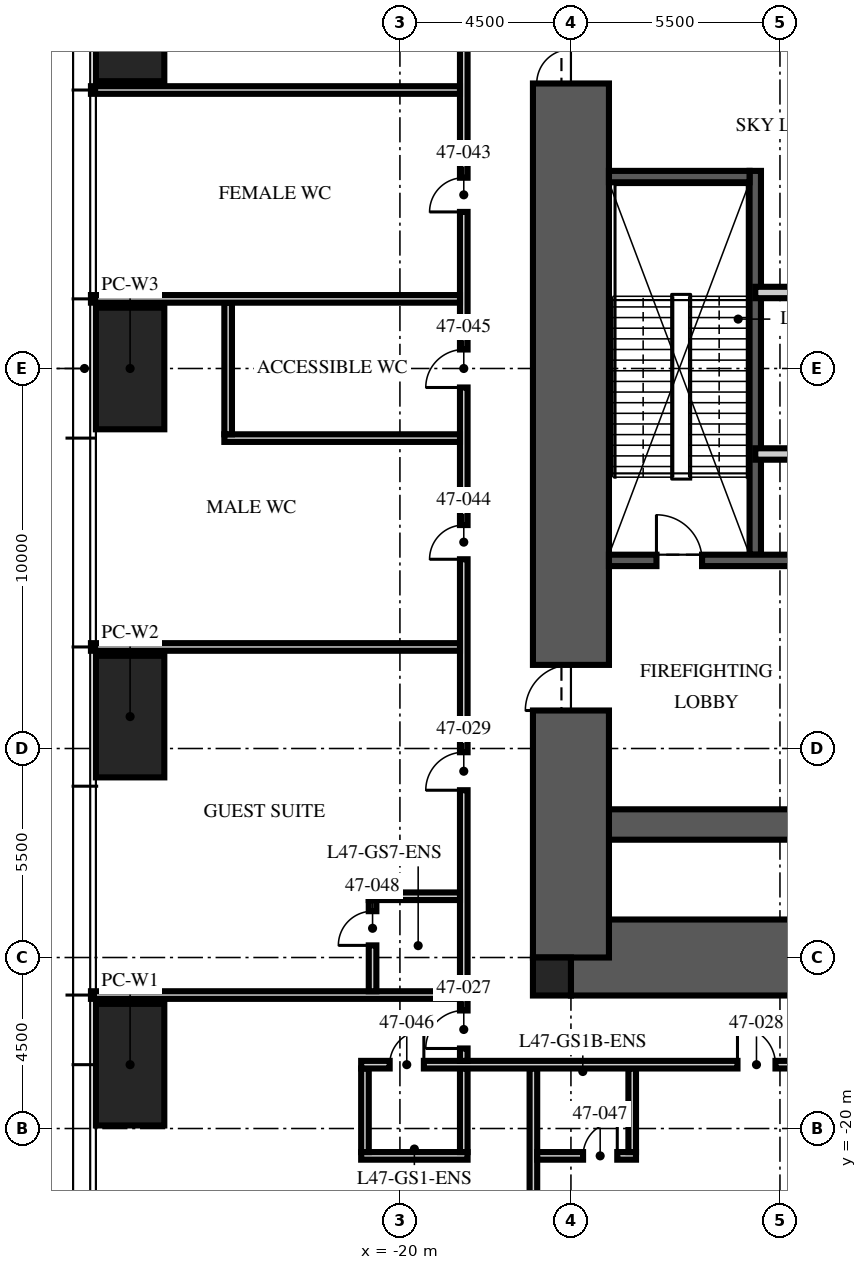
"""IFC4 building model, lengths in metres.
Left out: names, types, materials, properties, quantities, classifications, styles, units other than length and angle.
Written with IfcOpenShell. Run it as: python <this file> out.ifc"""

import sys

from ifc_helpers import new_model, si_unit, direction, frame, frame_2d, origin, origin_2d, place, context, subcontext, project, spatial, rectangle, hollow_rectangle, extrude, element, fill, save


model = new_model("IFC4")
c1 = context("Model", 3, precision=1e-05, world=origin(), true_north=direction((0.0, 1.0)))
c2 = subcontext(c1, "Body", "Model", "MODEL_VIEW")
j1 = project(units=[si_unit("LENGTHUNIT", "METRE"), si_unit("PLANEANGLEUNIT", "RADIAN")], contexts=[c1])
p1 = place(None, origin())
s1 = spatial("IfcSite", under=j1, at=p1, CompositionType="ELEMENT")
p2 = place(p1, origin())
s2 = spatial("IfcBuilding", under=s1, at=p2, CompositionType="ELEMENT")
p3 = place(p2, frame((0.0, 0.0, 186.0)))
s3 = spatial("IfcBuildingStorey", under=s2, at=p3, CompositionType="ELEMENT", Elevation=186.0)
p4 = place(p3, frame((-15.5, -15.5, -0.3), z_axis=(0.0, 0.0, 1.0), x_axis=(1.0, 0.0, 0.0)))
e1 = element("IfcWall", 1, at=p4, inside=s3, PredefinedType="SHEAR", context=c2, shape_type="SweptSolid", body=[
    extrude(rectangle(XDim=31.0, YDim=2.0, at=frame_2d((15.5, 0.0))), origin(), (0.0, 0.0, 1.0), 5.95),
])
p5 = place(p4, frame((10.4, 0.0, 0.3)))
e2 = element("IfcOpeningElement", 2, at=p5, cuts=e1, PredefinedType="OPENING", context=c2, shape_type="SweptSolid", body=[
    extrude(rectangle(XDim=1.1, YDim=2.1, at=frame_2d((0.55, 1.05))), frame((0.0, 1.01, 0.0), z_axis=(0.0, -1.0, 0.0), x_axis=(1.0, 0.0, 0.0)), (0.0, 0.0, 1.0), 2.02),
])
p6 = place(p4, frame((13.5, 0.0, 0.3)))
e3 = element("IfcOpeningElement", 3, at=p6, cuts=e1, PredefinedType="OPENING", context=c2, shape_type="SweptSolid", body=[
    extrude(rectangle(XDim=1.1, YDim=2.1, at=frame_2d((0.55, 1.05))), frame((0.0, 1.01, 0.0), z_axis=(0.0, -1.0, 0.0), x_axis=(1.0, 0.0, 0.0)), (0.0, 0.0, 1.0), 2.02),
])
p7 = place(p4, frame((16.6, 0.0, 0.3)))
e4 = element("IfcOpeningElement", 4, at=p7, cuts=e1, PredefinedType="OPENING", context=c2, shape_type="SweptSolid", body=[
    extrude(rectangle(XDim=1.1, YDim=2.1, at=frame_2d((0.55, 1.05))), frame((0.0, 1.01, 0.0), z_axis=(0.0, -1.0, 0.0), x_axis=(1.0, 0.0, 0.0)), (0.0, 0.0, 1.0), 2.02),
])
p8 = place(p3, frame((-15.5, -12.0, -0.3), z_axis=(0.0, 0.0, 1.0), x_axis=(1.0, 0.0, 0.0)))
e5 = element("IfcWall", 5, at=p8, inside=s3, PredefinedType="SHEAR", context=c2, shape_type="SweptSolid", body=[
    extrude(rectangle(XDim=31.0, YDim=0.8, at=frame_2d((15.5, 0.0))), origin(), (0.0, 0.0, 1.0), 5.95),
])
p9 = place(p3, frame((-15.5, -15.5, -0.3), z_axis=(0.0, 0.0, 1.0), x_axis=(0.0, 1.0, 0.0)))
e6 = element("IfcWall", 6, at=p9, inside=s3, PredefinedType="SHEAR", context=c2, shape_type="SweptSolid", body=[
    extrude(rectangle(XDim=31.0, YDim=2.0, at=frame_2d((15.5, 0.0))), origin(), (0.0, 0.0, 1.0), 5.95),
])
p10 = place(p9, frame((6.5, 0.0, 0.3)))
e7 = element("IfcOpeningElement", 7, at=p10, cuts=e6, PredefinedType="OPENING", context=c2, shape_type="SweptSolid", body=[
    extrude(rectangle(XDim=1.2, YDim=2.1, at=frame_2d((0.6, 1.05))), frame((0.0, 1.01, 0.0), z_axis=(0.0, -1.0, 0.0), x_axis=(1.0, 0.0, 0.0)), (0.0, 0.0, 1.0), 2.02),
])
p11 = place(p9, frame((23.0, 0.0, 0.3)))
e8 = element("IfcOpeningElement", 8, at=p11, cuts=e6, PredefinedType="OPENING", context=c2, shape_type="SweptSolid", body=[
    extrude(rectangle(XDim=1.8, YDim=2.1, at=frame_2d((0.9, 1.05))), frame((0.0, 1.01, 0.0), z_axis=(0.0, -1.0, 0.0), x_axis=(1.0, 0.0, 0.0)), (0.0, 0.0, 1.0), 2.02),
])
p12 = place(p3, frame((-16.0, -16.0, -0.3), z_axis=(0.0, 0.0, 1.0), x_axis=(1.0, 0.0, 0.0)))
e9 = element("IfcColumn", 9, at=p12, inside=s3, PredefinedType="COLUMN", context=c2, shape_type="SweptSolid", body=[
    extrude(rectangle(XDim=1.0, YDim=1.0, at=origin_2d()), origin(), (0.0, 0.0, 1.0), 5.95),
])
p13 = place(p3, frame((-27.1, -18.32, 0.0), z_axis=(0.0, 0.0, 1.0), x_axis=(0.0, 1.0, 0.0)))
e10 = element("IfcColumn", 10, at=p13, inside=s3, PredefinedType="COLUMN", context=c2, shape_type="SweptSolid", body=[
    extrude(hollow_rectangle(XDim=3.2, YDim=1.8, WallThickness=0.2, at=origin_2d()), origin(), (0.0, 0.0, 1.0), 4.72),
])
p14 = place(p3, frame((-27.1, -9.16, 0.0), z_axis=(0.0, 0.0, 1.0), x_axis=(0.0, 1.0, 0.0)))
e11 = element("IfcColumn", 11, at=p14, inside=s3, PredefinedType="COLUMN", context=c2, shape_type="SweptSolid", body=[
    extrude(hollow_rectangle(XDim=3.2, YDim=1.8, WallThickness=0.2, at=origin_2d()), origin(), (0.0, 0.0, 1.0), 4.87),
])
p15 = place(p3, frame((-27.1, 0.0, 0.0), z_axis=(0.0, 0.0, 1.0), x_axis=(0.0, 1.0, 0.0)))
e12 = element("IfcColumn", 12, at=p15, inside=s3, PredefinedType="COLUMN", context=c2, shape_type="SweptSolid", body=[
    extrude(hollow_rectangle(XDim=3.2, YDim=1.8, WallThickness=0.2, at=origin_2d()), origin(), (0.0, 0.0, 1.0), 5.03),
])
p16 = place(p3, frame((-27.1, 9.16, 0.0), z_axis=(0.0, 0.0, 1.0), x_axis=(0.0, 1.0, 0.0)))
e13 = element("IfcColumn", 13, at=p16, inside=s3, PredefinedType="COLUMN", context=c2, shape_type="SweptSolid", body=[
    extrude(hollow_rectangle(XDim=3.2, YDim=1.8, WallThickness=0.2, at=origin_2d()), origin(), (0.0, 0.0, 1.0), 4.87),
])
p17 = place(p3, frame((-10.65, -4.9, 0.0), z_axis=(0.0, 0.0, 1.0), x_axis=(0.0, 1.0, 0.0)))
e14 = element("IfcWall", 14, at=p17, inside=s3, PredefinedType="SOLIDWALL", context=c2, shape_type="SweptSolid", body=[
    extrude(rectangle(XDim=10.1, YDim=0.3, at=frame_2d((5.05, 0.0))), origin(), (0.0, 0.0, 1.0), 5.65),
])
p18 = place(p3, frame((-14.5, -5.05, 0.0), z_axis=(0.0, 0.0, 1.0), x_axis=(1.0, 0.0, 0.0)))
e15 = element("IfcWall", 15, at=p18, inside=s3, PredefinedType="SOLIDWALL", context=c2, shape_type="SweptSolid", body=[
    extrude(rectangle(XDim=5.7, YDim=0.3, at=frame_2d((2.85, 0.0))), origin(), (0.0, 0.0, 1.0), 5.65),
])
p19 = place(p18, frame((1.25, 0.0, 0.0)))
e16 = element("IfcOpeningElement", 16, at=p19, cuts=e15, PredefinedType="OPENING", context=c2, shape_type="SweptSolid", body=[
    extrude(rectangle(XDim=1.2, YDim=2.1, at=frame_2d((0.6, 1.05))), frame((0.0, 0.16, 0.0), z_axis=(0.0, -1.0, 0.0), x_axis=(1.0, 0.0, 0.0)), (0.0, 0.0, 1.0), 0.32),
])
p20 = place(p3, frame((-14.5, 5.05, 0.0), z_axis=(0.0, 0.0, 1.0), x_axis=(1.0, 0.0, 0.0)))
e17 = element("IfcWall", 17, at=p20, inside=s3, PredefinedType="SOLIDWALL", context=c2, shape_type="SweptSolid", body=[
    extrude(rectangle(XDim=3.7, YDim=0.3, at=frame_2d((1.85, 0.0))), origin(), (0.0, 0.0, 1.0), 5.65),
])
p21 = place(p3, frame((-10.65, 2.0, 0.0), z_axis=(0.0, 0.0, 1.0), x_axis=(1.0, 0.0, 0.0)))
e18 = element("IfcWall", 18, at=p21, inside=s3, PredefinedType="PARTITIONING", context=c2, shape_type="SweptSolid", body=[
    extrude(rectangle(XDim=21.3, YDim=0.3, at=frame_2d((10.65, 0.0))), origin(), (0.0, 0.0, 1.0), 5.65),
])
p22 = place(p21, frame((10.05, 0.0, 0.0)))
e19 = element("IfcOpeningElement", 19, at=p22, cuts=e18, PredefinedType="OPENING", context=c2, shape_type="SweptSolid", body=[
    extrude(rectangle(XDim=1.2, YDim=2.1, at=frame_2d((0.6, 1.05))), frame((0.0, 0.16, 0.0), z_axis=(0.0, -1.0, 0.0), x_axis=(1.0, 0.0, 0.0)), (0.0, 0.0, 1.0), 0.32),
])
p23 = place(p21, frame((18.942, 0.0, 0.0)))
e20 = element("IfcOpeningElement", 20, at=p23, cuts=e18, PredefinedType="OPENING", context=c2, shape_type="SweptSolid", body=[
    extrude(rectangle(XDim=0.9, YDim=2.1, at=frame_2d((0.45, 1.05))), frame((0.0, 0.16, 0.0), z_axis=(0.0, -1.0, 0.0), x_axis=(1.0, 0.0, 0.0)), (0.0, 0.0, 1.0), 0.32),
])
p24 = place(p3, frame((-10.65, -2.25, 0.0), z_axis=(0.0, 0.0, 1.0), x_axis=(1.0, 0.0, 0.0)))
e21 = element("IfcWall", 21, at=p24, inside=s3, PredefinedType="PARTITIONING", context=c2, shape_type="SweptSolid", body=[
    extrude(rectangle(XDim=7.35, YDim=0.3, at=frame_2d((3.675, 0.0))), origin(), (0.0, 0.0, 1.0), 5.65),
])
p25 = place(p3, frame((-16.488, -28.13, 0.0), z_axis=(0.0, 0.0, 1.0), x_axis=(0.0, 1.0, 0.0)))
e22 = element("IfcWall", 22, at=p25, inside=s3, PredefinedType="SOLIDWALL", context=c2, shape_type="SweptSolid", body=[
    extrude(rectangle(XDim=9.71, YDim=0.2, at=frame_2d((4.855, 0.0))), origin(), (0.0, 0.0, 1.0), 4.95),
])
p26 = place(p3, frame((-21.02, -20.72, 0.0), z_axis=(0.0, 0.0, 1.0), x_axis=(1.0, 0.0, 0.0)))
e23 = element("IfcWall", 23, at=p26, inside=s3, PredefinedType="SOLIDWALL", context=c2, shape_type="SweptSolid", body=[
    extrude(rectangle(XDim=2.8, YDim=0.2, at=frame_2d((1.4, 0.0))), origin(), (0.0, 0.0, 1.0), 4.45),
])
p27 = place(p3, frame((-16.388, -20.72, 0.0), z_axis=(0.0, 0.0, 1.0), x_axis=(1.0, 0.0, 0.0)))
e24 = element("IfcWall", 24, at=p27, inside=s3, PredefinedType="SOLIDWALL", context=c2, shape_type="SweptSolid", body=[
    extrude(rectangle(XDim=2.6, YDim=0.2, at=frame_2d((1.3, 0.0))), origin(), (0.0, 0.0, 1.0), 4.45),
])
p28 = place(p27, frame((1.207, 0.0, 0.0)))
e25 = element("IfcOpeningElement", 25, at=p28, cuts=e24, PredefinedType="OPENING", context=c2, shape_type="SweptSolid", body=[
    extrude(rectangle(XDim=0.9, YDim=2.1, at=frame_2d((0.45, 1.05))), frame((0.0, 0.11, 0.0), z_axis=(0.0, -1.0, 0.0), x_axis=(1.0, 0.0, 0.0)), (0.0, 0.0, 1.0), 0.22),
])
for number, where, z_axis, x_axis in (
    (26, (-20.92, -20.62, 0.0), (0.0, 0.0, 1.0), (0.0, 1.0, 0.0)),
    (27, (-18.32, -20.62, 0.0), (0.0, 0.0, 1.0), (0.0, 1.0, 0.0)),
    (28, (-13.888, -20.62, 0.0), (0.0, 0.0, 1.0), (0.0, 1.0, 0.0)),
):
    element("IfcWall", number, at=place(p3, frame(where, z_axis=z_axis, x_axis=x_axis)), inside=s3, PredefinedType="SOLIDWALL", context=c2, shape_type="SweptSolid", body=[
        extrude(rectangle(XDim=2.2, YDim=0.2, at=frame_2d((1.1, 0.0))), origin(), (0.0, 0.0, 1.0), 4.45),
    ])
p29 = place(p3, frame((-21.02, -18.32, 0.0), z_axis=(0.0, 0.0, 1.0), x_axis=(1.0, 0.0, 0.0)))
e29 = element("IfcWall", 29, at=p29, inside=s3, PredefinedType="SOLIDWALL", context=c2, shape_type="SweptSolid", body=[
    extrude(rectangle(XDim=42.04, YDim=0.2, at=frame_2d((21.02, 0.0))), origin(), (0.0, 0.0, 1.0), 4.45),
])
p30 = place(p29, frame((9.902, 0.0, 0.0)))
e30 = element("IfcOpeningElement", 30, at=p30, cuts=e29, PredefinedType="OPENING", context=c2, shape_type="SweptSolid", body=[
    extrude(rectangle(XDim=1.0, YDim=2.1, at=frame_2d((0.5, 1.05))), frame((0.0, 0.11, 0.0), z_axis=(0.0, -1.0, 0.0), x_axis=(1.0, 0.0, 0.0)), (0.0, 0.0, 1.0), 0.22),
])
p31 = place(p29, frame((20.13, 0.0, 0.0)))
e31 = element("IfcOpeningElement", 31, at=p31, cuts=e29, PredefinedType="OPENING", context=c2, shape_type="SweptSolid", body=[
    extrude(rectangle(XDim=1.8, YDim=2.4, at=frame_2d((0.9, 1.2))), frame((0.0, 0.11, 0.0), z_axis=(0.0, -1.0, 0.0), x_axis=(1.0, 0.0, 0.0)), (0.0, 0.0, 1.0), 0.22),
])
p32 = place(p29, frame((37.914, 0.0, 0.0)))
e32 = element("IfcOpeningElement", 32, at=p32, cuts=e29, PredefinedType="OPENING", context=c2, shape_type="SweptSolid", body=[
    extrude(rectangle(XDim=1.0, YDim=2.1, at=frame_2d((0.5, 1.05))), frame((0.0, 0.11, 0.0), z_axis=(0.0, -1.0, 0.0), x_axis=(1.0, 0.0, 0.0)), (0.0, 0.0, 1.0), 0.22),
])
p33 = place(p29, frame((31.118, 0.0, 0.0)))
e33 = element("IfcOpeningElement", 33, at=p33, cuts=e29, PredefinedType="OPENING", context=c2, shape_type="SweptSolid", body=[
    extrude(rectangle(XDim=1.0, YDim=2.1, at=frame_2d((0.5, 1.05))), frame((0.0, 0.11, 0.0), z_axis=(0.0, -1.0, 0.0), x_axis=(1.0, 0.0, 0.0)), (0.0, 0.0, 1.0), 0.22),
])
p34 = place(p29, frame((0.75, 0.0, 0.0)))
e34 = element("IfcOpeningElement", 34, at=p34, cuts=e29, PredefinedType="OPENING", context=c2, shape_type="SweptSolid", body=[
    extrude(rectangle(XDim=0.9, YDim=2.1, at=frame_2d((0.45, 1.05))), frame((0.0, 0.11, 0.0), z_axis=(0.0, -1.0, 0.0), x_axis=(1.0, 0.0, 0.0)), (0.0, 0.0, 1.0), 0.22),
])
p35 = place(p29, frame((39.99, 0.0, 0.0)))
e35 = element("IfcOpeningElement", 35, at=p35, cuts=e29, PredefinedType="OPENING", context=c2, shape_type="SweptSolid", body=[
    extrude(rectangle(XDim=0.9, YDim=2.1, at=frame_2d((0.45, 1.05))), frame((0.0, 0.11, 0.0), z_axis=(0.0, -1.0, 0.0), x_axis=(1.0, 0.0, 0.0)), (0.0, 0.0, 1.0), 0.22),
])
p36 = place(p3, frame((-18.32, -18.22, 0.0), z_axis=(0.0, 0.0, 1.0), x_axis=(0.0, 1.0, 0.0)))
e36 = element("IfcWall", 36, at=p36, inside=s3, PredefinedType="SOLIDWALL", context=c2, shape_type="SweptSolid", body=[
    extrude(rectangle(XDim=36.44, YDim=0.2, at=frame_2d((18.22, 0.0))), origin(), (0.0, 0.0, 1.0), 4.45),
])
p37 = place(p36, frame((0.326, 0.0, 0.0)))
e37 = element("IfcOpeningElement", 37, at=p37, cuts=e36, PredefinedType="OPENING", context=c2, shape_type="SweptSolid", body=[
    extrude(rectangle(XDim=1.0, YDim=2.1, at=frame_2d((0.5, 1.05))), frame((0.0, 0.11, 0.0), z_axis=(0.0, -1.0, 0.0), x_axis=(1.0, 0.0, 0.0)), (0.0, 0.0, 1.0), 0.22),
])
p38 = place(p36, frame((7.122, 0.0, 0.0)))
e38 = element("IfcOpeningElement", 38, at=p38, cuts=e36, PredefinedType="OPENING", context=c2, shape_type="SweptSolid", body=[
    extrude(rectangle(XDim=1.0, YDim=2.1, at=frame_2d((0.5, 1.05))), frame((0.0, 0.11, 0.0), z_axis=(0.0, -1.0, 0.0), x_axis=(1.0, 0.0, 0.0)), (0.0, 0.0, 1.0), 0.22),
])
p39 = place(p36, frame((28.338, 0.0, 0.0)))
e39 = element("IfcOpeningElement", 39, at=p39, cuts=e36, PredefinedType="OPENING", context=c2, shape_type="SweptSolid", body=[
    extrude(rectangle(XDim=1.0, YDim=2.1, at=frame_2d((0.5, 1.05))), frame((0.0, 0.11, 0.0), z_axis=(0.0, -1.0, 0.0), x_axis=(1.0, 0.0, 0.0)), (0.0, 0.0, 1.0), 0.22),
])
p40 = place(p36, frame((22.34, 0.0, 0.0)))
e40 = element("IfcOpeningElement", 40, at=p40, cuts=e36, PredefinedType="OPENING", context=c2, shape_type="SweptSolid", body=[
    extrude(rectangle(XDim=0.9, YDim=2.1, at=frame_2d((0.45, 1.05))), frame((0.0, 0.11, 0.0), z_axis=(0.0, -1.0, 0.0), x_axis=(1.0, 0.0, 0.0)), (0.0, 0.0, 1.0), 0.22),
])
p41 = place(p36, frame((13.2, 0.0, 0.0)))
e41 = element("IfcOpeningElement", 41, at=p41, cuts=e36, PredefinedType="OPENING", context=c2, shape_type="SweptSolid", body=[
    extrude(rectangle(XDim=0.9, YDim=2.1, at=frame_2d((0.45, 1.05))), frame((0.0, 0.11, 0.0), z_axis=(0.0, -1.0, 0.0), x_axis=(1.0, 0.0, 0.0)), (0.0, 0.0, 1.0), 0.22),
])
p42 = place(p36, frame((17.72, 0.0, 0.0)))
e42 = element("IfcOpeningElement", 42, at=p42, cuts=e36, PredefinedType="OPENING", context=c2, shape_type="SweptSolid", body=[
    extrude(rectangle(XDim=1.0, YDim=2.1, at=frame_2d((0.5, 1.05))), frame((0.0, 0.11, 0.0), z_axis=(0.0, -1.0, 0.0), x_axis=(1.0, 0.0, 0.0)), (0.0, 0.0, 1.0), 0.22),
])
p43 = place(p3, frame((-28.13, -16.488, 0.0), z_axis=(0.0, 0.0, 1.0), x_axis=(1.0, 0.0, 0.0)))
e43 = element("IfcWall", 43, at=p43, inside=s3, PredefinedType="SOLIDWALL", context=c2, shape_type="SweptSolid", body=[
    extrude(rectangle(XDim=9.71, YDim=0.2, at=frame_2d((4.855, 0.0))), origin(), (0.0, 0.0, 1.0), 4.95),
])
p44 = place(p3, frame((-20.72, -16.388, 0.0), z_axis=(0.0, 0.0, 1.0), x_axis=(0.0, 1.0, 0.0)))
e44 = element("IfcWall", 44, at=p44, inside=s3, PredefinedType="SOLIDWALL", context=c2, shape_type="SweptSolid", body=[
    extrude(rectangle(XDim=2.4, YDim=0.2, at=frame_2d((1.2, 0.0))), origin(), (0.0, 0.0, 1.0), 5.65),
])
p45 = place(p44, frame((1.207, 0.0, 0.0)))
e45 = element("IfcOpeningElement", 45, at=p45, cuts=e44, PredefinedType="OPENING", context=c2, shape_type="SweptSolid", body=[
    extrude(rectangle(XDim=0.9, YDim=2.1, at=frame_2d((0.45, 1.05))), frame((0.0, 0.11, 0.0), z_axis=(0.0, -1.0, 0.0), x_axis=(1.0, 0.0, 0.0)), (0.0, 0.0, 1.0), 0.22),
])
p46 = place(p3, frame((-20.82, -13.888, 0.0), z_axis=(0.0, 0.0, 1.0), x_axis=(1.0, 0.0, 0.0)))
e46 = element("IfcWall", 46, at=p46, inside=s3, PredefinedType="SOLIDWALL", context=c2, shape_type="SweptSolid", body=[
    extrude(rectangle(XDim=2.4, YDim=0.2, at=frame_2d((1.2, 0.0))), origin(), (0.0, 0.0, 1.0), 4.45),
])
p47 = place(p3, frame((-28.13, -7.328, 0.0), z_axis=(0.0, 0.0, 1.0), x_axis=(1.0, 0.0, 0.0)))
e47 = element("IfcWall", 47, at=p47, inside=s3, PredefinedType="SOLIDWALL", context=c2, shape_type="SweptSolid", body=[
    extrude(rectangle(XDim=9.71, YDim=0.2, at=frame_2d((4.855, 0.0))), origin(), (0.0, 0.0, 1.0), 4.95),
])
p48 = place(p3, frame((-24.62, -1.832, 0.0), z_axis=(0.0, 0.0, 1.0), x_axis=(1.0, 0.0, 0.0)))
e48 = element("IfcWall", 48, at=p48, inside=s3, PredefinedType="SOLIDWALL", context=c2, shape_type="SweptSolid", body=[
    extrude(rectangle(XDim=6.2, YDim=0.2, at=frame_2d((3.1, 0.0))), origin(), (0.0, 0.0, 1.0), 5.65),
])
p49 = place(p3, frame((-24.52, -1.732, 0.0), z_axis=(0.0, 0.0, 1.0), x_axis=(0.0, 1.0, 0.0)))
e49 = element("IfcWall", 49, at=p49, inside=s3, PredefinedType="SOLIDWALL", context=c2, shape_type="SweptSolid", body=[
    extrude(rectangle(XDim=3.464, YDim=0.2, at=frame_2d((1.732, 0.0))), origin(), (0.0, 0.0, 1.0), 4.45),
])
for number, where, z_axis, x_axis in (
    (50, (-28.13, 1.832, 0.0), (0.0, 0.0, 1.0), (1.0, 0.0, 0.0)),
    (51, (-28.13, 7.328, 0.0), (0.0, 0.0, 1.0), (1.0, 0.0, 0.0)),
):
    element("IfcWall", number, at=place(p3, frame(where, z_axis=z_axis, x_axis=x_axis)), inside=s3, PredefinedType="SOLIDWALL", context=c2, shape_type="SweptSolid", body=[
        extrude(rectangle(XDim=9.71, YDim=0.2, at=frame_2d((4.855, 0.0))), origin(), (0.0, 0.0, 1.0), 4.95),
    ])
p50 = place(p19, origin())
e52 = element("IfcDoor", 52, at=p50, inside=s3, OperationType="SINGLE_SWING_LEFT", PredefinedType="DOOR", context=c2, shape_type="SweptSolid", body=[
    extrude(rectangle(XDim=1.2, YDim=2.1, at=frame_2d((0.6, 1.05))), frame((0.0, 0.025, 0.0), z_axis=(0.0, -1.0, 0.0), x_axis=(1.0, 0.0, 0.0)), (0.0, 0.0, 1.0), 0.05),
])
fill(e16, e52)
p51 = place(p10, origin())
e53 = element("IfcDoor", 53, at=p51, inside=s3, OperationType="SINGLE_SWING_LEFT", PredefinedType="DOOR", context=c2, shape_type="SweptSolid", body=[
    extrude(rectangle(XDim=1.2, YDim=2.1, at=frame_2d((0.6, 1.05))), frame((0.0, 0.025, 0.0), z_axis=(0.0, -1.0, 0.0), x_axis=(1.0, 0.0, 0.0)), (0.0, 0.0, 1.0), 0.05),
])
fill(e7, e53)
p52 = place(p11, origin())
e54 = element("IfcDoor", 54, at=p52, inside=s3, OperationType="DOUBLE_DOOR_SINGLE_SWING", PredefinedType="DOOR", context=c2, shape_type="SweptSolid", body=[
    extrude(rectangle(XDim=1.8, YDim=2.1, at=frame_2d((0.9, 1.05))), frame((0.0, 0.025, 0.0), z_axis=(0.0, -1.0, 0.0), x_axis=(1.0, 0.0, 0.0)), (0.0, 0.0, 1.0), 0.05),
])
fill(e8, e54)
p53 = place(p37, origin())
e55 = element("IfcDoor", 55, at=p53, inside=s3, OperationType="SINGLE_SWING_LEFT", PredefinedType="DOOR", context=c2, shape_type="SweptSolid", body=[
    extrude(rectangle(XDim=1.0, YDim=2.1, at=frame_2d((0.5, 1.05))), frame((0.0, 0.025, 0.0), z_axis=(0.0, -1.0, 0.0), x_axis=(1.0, 0.0, 0.0)), (0.0, 0.0, 1.0), 0.05),
])
fill(e37, e55)
p54 = place(p30, origin())
e56 = element("IfcDoor", 56, at=p54, inside=s3, OperationType="SINGLE_SWING_LEFT", PredefinedType="DOOR", context=c2, shape_type="SweptSolid", body=[
    extrude(rectangle(XDim=1.0, YDim=2.1, at=frame_2d((0.5, 1.05))), frame((0.0, 0.025, 0.0), z_axis=(0.0, -1.0, 0.0), x_axis=(1.0, 0.0, 0.0)), (0.0, 0.0, 1.0), 0.05),
])
fill(e30, e56)
p55 = place(p38, origin())
e57 = element("IfcDoor", 57, at=p55, inside=s3, OperationType="SINGLE_SWING_LEFT", PredefinedType="DOOR", context=c2, shape_type="SweptSolid", body=[
    extrude(rectangle(XDim=1.0, YDim=2.1, at=frame_2d((0.5, 1.05))), frame((0.0, 0.025, 0.0), z_axis=(0.0, -1.0, 0.0), x_axis=(1.0, 0.0, 0.0)), (0.0, 0.0, 1.0), 0.05),
])
fill(e38, e57)
p56 = place(p40, origin())
e58 = element("IfcDoor", 58, at=p56, inside=s3, OperationType="SINGLE_SWING_LEFT", PredefinedType="DOOR", context=c2, shape_type="SweptSolid", body=[
    extrude(rectangle(XDim=0.9, YDim=2.1, at=frame_2d((0.45, 1.05))), frame((0.0, 0.025, 0.0), z_axis=(0.0, -1.0, 0.0), x_axis=(1.0, 0.0, 0.0)), (0.0, 0.0, 1.0), 0.05),
])
fill(e40, e58)
p57 = place(p41, origin())
e59 = element("IfcDoor", 59, at=p57, inside=s3, OperationType="SINGLE_SWING_LEFT", PredefinedType="DOOR", context=c2, shape_type="SweptSolid", body=[
    extrude(rectangle(XDim=0.9, YDim=2.1, at=frame_2d((0.45, 1.05))), frame((0.0, 0.025, 0.0), z_axis=(0.0, -1.0, 0.0), x_axis=(1.0, 0.0, 0.0)), (0.0, 0.0, 1.0), 0.05),
])
fill(e41, e59)
p58 = place(p42, origin())
e60 = element("IfcDoor", 60, at=p58, inside=s3, OperationType="SINGLE_SWING_LEFT", PredefinedType="DOOR", context=c2, shape_type="SweptSolid", body=[
    extrude(rectangle(XDim=1.0, YDim=2.1, at=frame_2d((0.5, 1.05))), frame((0.0, 0.025, 0.0), z_axis=(0.0, -1.0, 0.0), x_axis=(1.0, 0.0, 0.0)), (0.0, 0.0, 1.0), 0.05),
])
fill(e42, e60)
p59 = place(p34, origin())
e61 = element("IfcDoor", 61, at=p59, inside=s3, OperationType="SINGLE_SWING_RIGHT", PredefinedType="DOOR", context=c2, shape_type="SweptSolid", body=[
    extrude(rectangle(XDim=0.9, YDim=2.1, at=frame_2d((0.45, 1.05))), frame((0.0, 0.025, 0.0), z_axis=(0.0, -1.0, 0.0), x_axis=(1.0, 0.0, 0.0)), (0.0, 0.0, 1.0), 0.05),
])
fill(e34, e61)
p60 = place(p28, origin())
e62 = element("IfcDoor", 62, at=p60, inside=s3, OperationType="SINGLE_SWING_RIGHT", PredefinedType="DOOR", context=c2, shape_type="SweptSolid", body=[
    extrude(rectangle(XDim=0.9, YDim=2.1, at=frame_2d((0.45, 1.05))), frame((0.0, 0.025, 0.0), z_axis=(0.0, -1.0, 0.0), x_axis=(1.0, 0.0, 0.0)), (0.0, 0.0, 1.0), 0.05),
])
fill(e25, e62)
p61 = place(p45, origin())
e63 = element("IfcDoor", 63, at=p61, inside=s3, OperationType="SINGLE_SWING_LEFT", PredefinedType="DOOR", context=c2, shape_type="SweptSolid", body=[
    extrude(rectangle(XDim=0.9, YDim=2.1, at=frame_2d((0.45, 1.05))), frame((0.0, 0.025, 0.0), z_axis=(0.0, -1.0, 0.0), x_axis=(1.0, 0.0, 0.0)), (0.0, 0.0, 1.0), 0.05),
])
fill(e45, e63)
save(model, sys.argv[1])
